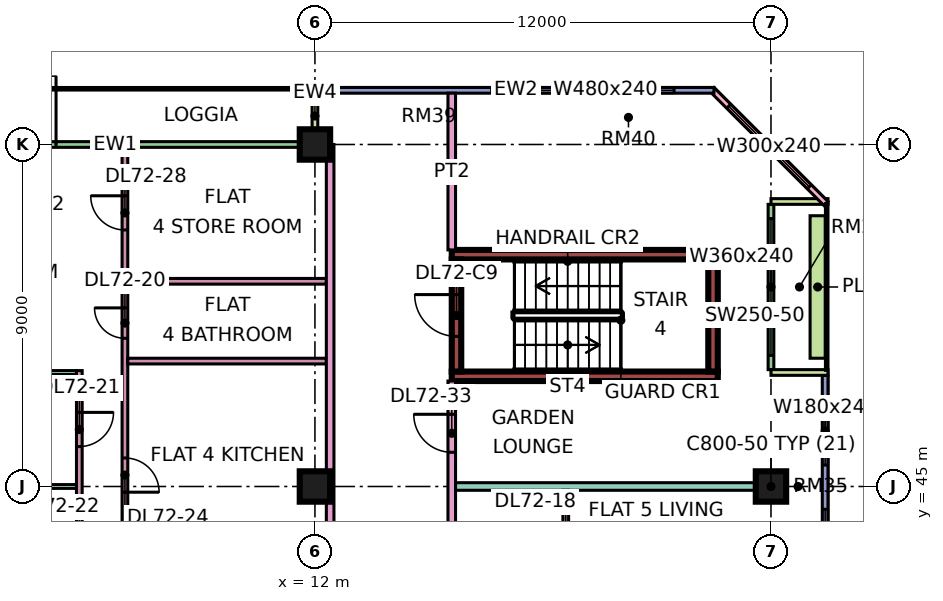
"""IFC4 building model, lengths in metres.
Left out: names, types, materials, properties, quantities, classifications, styles, units other than length and angle.
Written with IfcOpenShell. Run it as: python <this file> out.ifc"""

import sys

from ifc_helpers import new_model, si_unit, direction, frame, frame_2d, origin, origin_2d, place, context, subcontext, project, spatial, rectangle, extrude, element, fill, save


model = new_model("IFC4")
c1 = context("Model", 3, precision=1e-05, world=origin(), true_north=direction((0.0, 1.0)))
c2 = subcontext(c1, "Body", "Model", "MODEL_VIEW")
j1 = project(units=[si_unit("LENGTHUNIT", "METRE"), si_unit("PLANEANGLEUNIT", "RADIAN")], contexts=[c1])
p1 = place(None, origin())
s1 = spatial("IfcSite", under=j1, at=p1, CompositionType="ELEMENT")
p2 = place(p1, origin())
s2 = spatial("IfcBuilding", under=s1, at=p2, CompositionType="ELEMENT")
p3 = place(p2, frame((0.0, 0.0, 307.15)))
s3 = spatial("IfcBuildingStorey", under=s2, at=p3, CompositionType="ELEMENT", Elevation=307.15)
for number, where, z_axis, x_axis in (
    (1, (12.0, 45.0, 0.0), (0.0, 0.0, 1.0), (1.0, 0.0, 0.0)),
    (2, (12.0, 54.0, 0.0), (0.0, 0.0, 1.0), (1.0, 0.0, 0.0)),
    (3, (24.0, 45.0, 0.0), (0.0, 0.0, 1.0), (1.0, 0.0, 0.0)),
):
    element("IfcColumn", number, at=place(p3, frame(where, z_axis=z_axis, x_axis=x_axis)), inside=s3, PredefinedType="COLUMN", context=c2, shape_type="SweptSolid", body=[
        extrude(rectangle(XDim=0.8, YDim=0.8, at=origin_2d()), origin(), (0.0, 0.0, 1.0), 3.75),
    ])
for number, where, z_axis, x_axis in (
    (4, (15.6, 47.9, 0.0), (0.0, 0.0, 1.0), (1.0, 0.0, 0.0)),
    (5, (15.6, 51.1, 0.0), (0.0, 0.0, 1.0), (1.0, 0.0, 0.0)),
):
    element("IfcWall", number, at=place(p3, frame(where, z_axis=z_axis, x_axis=x_axis)), inside=s3, PredefinedType="SHEAR", context=c2, shape_type="SweptSolid", body=[
        extrude(rectangle(XDim=7.0, YDim=0.25, at=frame_2d((3.5, 0.0))), origin(), (0.0, 0.0, 1.0), 3.75),
    ])
p4 = place(p3, frame((15.725, 48.025, 0.0), z_axis=(0.0, 0.0, 1.0), x_axis=(0.0, 1.0, 0.0)))
e6 = element("IfcWall", 6, at=p4, inside=s3, PredefinedType="SHEAR", context=c2, shape_type="SweptSolid", body=[
    extrude(rectangle(XDim=2.95, YDim=0.25, at=frame_2d((1.475, 0.0))), origin(), (0.0, 0.0, 1.0), 3.75),
])
p5 = place(p4, frame((0.925, 0.0, 0.0)))
e7 = element("IfcOpeningElement", 7, at=p5, cuts=e6, PredefinedType="OPENING", context=c2, shape_type="SweptSolid", body=[
    extrude(rectangle(XDim=1.1, YDim=2.2, at=frame_2d((0.55, 1.1))), frame((0.0, 0.135, 0.0), z_axis=(0.0, -1.0, 0.0), x_axis=(1.0, 0.0, 0.0)), (0.0, 0.0, 1.0), 0.27),
])
p6 = place(p3, frame((22.475, 48.025, 0.0), z_axis=(0.0, 0.0, 1.0), x_axis=(0.0, 1.0, 0.0)))
e8 = element("IfcWall", 8, at=p6, inside=s3, PredefinedType="SHEAR", context=c2, shape_type="SweptSolid", body=[
    extrude(rectangle(XDim=2.95, YDim=0.25, at=frame_2d((1.475, 0.0))), origin(), (0.0, 0.0, 1.0), 3.75),
])
p7 = place(p3, frame((25.425, 40.5, 0.0), z_axis=(0.0, 0.0, 1.0), x_axis=(0.0, 1.0, 0.0)))
e9 = element("IfcWall", 9, at=p7, inside=s3, PredefinedType="SOLIDWALL", context=c2, shape_type="SweptSolid", body=[
    extrude(rectangle(XDim=7.425, YDim=0.15, at=frame_2d((3.712, 0.0))), origin(), (0.0, 0.0, 1.0), 3.35),
])
p8 = place(p7, frame((0.3, 0.0, 0.45)))
e10 = element("IfcOpeningElement", 10, at=p8, cuts=e9, PredefinedType="OPENING", context=c2, shape_type="SweptSolid", body=[
    extrude(rectangle(XDim=0.9, YDim=2.4, at=frame_2d((0.45, 1.2))), frame((0.0, 0.085, 0.0), z_axis=(0.0, -1.0, 0.0), x_axis=(1.0, 0.0, 0.0)), (0.0, 0.0, 1.0), 0.17),
])
p9 = place(p7, frame((2.1, 0.0, 0.45)))
e11 = element("IfcOpeningElement", 11, at=p9, cuts=e9, PredefinedType="OPENING", context=c2, shape_type="SweptSolid", body=[
    extrude(rectangle(XDim=1.8, YDim=2.4, at=frame_2d((0.9, 1.2))), frame((0.0, 0.085, 0.0), z_axis=(0.0, -1.0, 0.0), x_axis=(1.0, 0.0, 0.0)), (0.0, 0.0, 1.0), 0.17),
])
p10 = place(p7, frame((5.062, 0.0, 0.45)))
e12 = element("IfcOpeningElement", 12, at=p10, cuts=e9, PredefinedType="OPENING", context=c2, shape_type="SweptSolid", body=[
    extrude(rectangle(XDim=1.8, YDim=2.4, at=frame_2d((0.9, 1.2))), frame((0.0, 0.085, 0.0), z_axis=(0.0, -1.0, 0.0), x_axis=(1.0, 0.0, 0.0)), (0.0, 0.0, 1.0), 0.17),
])
p11 = place(p3, frame((24.0, 48.075, 0.0), z_axis=(0.0, 0.0, 1.0), x_axis=(0.0, 1.0, 0.0)))
e13 = element("IfcWall", 13, at=p11, inside=s3, PredefinedType="SOLIDWALL", context=c2, shape_type="SweptSolid", body=[
    extrude(rectangle(XDim=4.35, YDim=0.15, at=frame_2d((2.175, 0.0))), origin(), (0.0, 0.0, 1.0), 3.35),
])
p12 = place(p11, frame((0.375, 0.0, 0.45)))
e14 = element("IfcOpeningElement", 14, at=p12, cuts=e13, PredefinedType="OPENING", context=c2, shape_type="SweptSolid", body=[
    extrude(rectangle(XDim=3.6, YDim=2.4, at=frame_2d((1.8, 1.2))), frame((0.0, 0.085, 0.0), z_axis=(0.0, -1.0, 0.0), x_axis=(1.0, 0.0, 0.0)), (0.0, 0.0, 1.0), 0.17),
])
for number, where, z_axis, x_axis in (
    (15, (25.5, 48.0, 0.0), (0.0, 0.0, 1.0), (-1.0, 0.0, 0.0)),
    (16, (25.5, 52.5, 0.0), (0.0, 0.0, 1.0), (-1.0, 0.0, 0.0)),
):
    element("IfcWall", number, at=place(p3, frame(where, z_axis=z_axis, x_axis=x_axis)), inside=s3, PredefinedType="SOLIDWALL", context=c2, shape_type="SweptSolid", body=[
        extrude(rectangle(XDim=1.5, YDim=0.15, at=frame_2d((0.75, 0.0))), origin(), (0.0, 0.0, 1.0), 3.35),
    ])
p13 = place(p3, frame((25.447, 52.447, 0.0), z_axis=(0.0, 0.0, 1.0), x_axis=(-0.707106781187, 0.707106781187, 0.0)))
e17 = element("IfcWall", 17, at=p13, inside=s3, PredefinedType="SOLIDWALL", context=c2, shape_type="SweptSolid", body=[
    extrude(rectangle(XDim=4.243, YDim=0.15, at=frame_2d((2.121, 0.0))), origin(), (0.0, 0.0, 1.0), 3.35),
])
p14 = place(p13, frame((0.621, 0.0, 0.45)))
e18 = element("IfcOpeningElement", 18, at=p14, cuts=e17, PredefinedType="OPENING", context=c2, shape_type="SweptSolid", body=[
    extrude(rectangle(XDim=3.0, YDim=2.4, at=frame_2d((1.5, 1.2))), frame((0.0, 0.085, 0.0), z_axis=(0.0, -1.0, 0.0), x_axis=(1.0, 0.0, 0.0)), (0.0, 0.0, 1.0), 0.17),
])
p15 = place(p3, frame((22.5, 55.425, 0.0), z_axis=(0.0, 0.0, 1.0), x_axis=(-1.0, 0.0, 0.0)))
e19 = element("IfcWall", 19, at=p15, inside=s3, PredefinedType="SOLIDWALL", context=c2, shape_type="SweptSolid", body=[
    extrude(rectangle(XDim=10.425, YDim=0.15, at=frame_2d((5.212, 0.0))), origin(), (0.0, 0.0, 1.0), 3.35),
])
p16 = place(p15, frame((1.05, 0.0, 0.45)))
e20 = element("IfcOpeningElement", 20, at=p16, cuts=e19, PredefinedType="OPENING", context=c2, shape_type="SweptSolid", body=[
    extrude(rectangle(XDim=4.8, YDim=2.4, at=frame_2d((2.4, 1.2))), frame((0.0, 0.085, 0.0), z_axis=(0.0, -1.0, 0.0), x_axis=(1.0, 0.0, 0.0)), (0.0, 0.0, 1.0), 0.17),
])
p17 = place(p3, frame((11.925, 54.0, 0.0), z_axis=(0.0, 0.0, 1.0), x_axis=(-1.0, 0.0, 0.0)))
e21 = element("IfcWall", 21, at=p17, inside=s3, PredefinedType="SOLIDWALL", context=c2, shape_type="SweptSolid", body=[
    extrude(rectangle(XDim=10.35, YDim=0.15, at=frame_2d((5.175, 0.0))), origin(), (0.0, 0.0, 1.0), 3.35),
])
p18 = place(p17, frame((6.738, 0.0, 0.0)))
e22 = element("IfcOpeningElement", 22, at=p18, cuts=e21, PredefinedType="OPENING", context=c2, shape_type="SweptSolid", body=[
    extrude(rectangle(XDim=1.8, YDim=2.4, at=frame_2d((0.9, 1.2))), frame((0.0, 0.085, 0.0), z_axis=(0.0, -1.0, 0.0), x_axis=(1.0, 0.0, 0.0)), (0.0, 0.0, 1.0), 0.17),
])
p19 = place(p3, frame((12.0, 55.5, 0.0), z_axis=(0.0, 0.0, 1.0), x_axis=(0.0, -1.0, 0.0)))
e23 = element("IfcWall", 23, at=p19, inside=s3, PredefinedType="SOLIDWALL", context=c2, shape_type="SweptSolid", body=[
    extrude(rectangle(XDim=1.5, YDim=0.15, at=frame_2d((0.75, 0.0))), origin(), (0.0, 0.0, 1.0), 3.35),
])
p20 = place(p3, frame((25.229, 48.375, 0.0), z_axis=(0.0, 0.0, 1.0), x_axis=(0.0, 1.0, 0.0)))
e24 = element("IfcWall", 24, at=p20, inside=s3, PredefinedType="SOLIDWALL", context=c2, shape_type="SweptSolid", body=[
    extrude(rectangle(XDim=3.75, YDim=0.4, at=frame_2d((1.875, 0.0))), origin(), (0.0, 0.0, 1.0), 0.7),
])
p21 = place(p3, frame((-1.351, 45.0, 0.0), z_axis=(0.0, 0.0, 1.0), x_axis=(1.0, 0.0, 0.0)))
e25 = element("IfcWall", 25, at=p21, inside=s3, PredefinedType="PARTITIONING", context=c2, shape_type="SweptSolid", body=[
    extrude(rectangle(XDim=7.076, YDim=0.1, at=frame_2d((3.538, 0.0))), origin(), (0.0, 0.0, 1.0), 3.35),
])
p22 = place(p3, frame((0.0, 48.0, 0.0), z_axis=(0.0, 0.0, 1.0), x_axis=(1.0, 0.0, 0.0)))
e26 = element("IfcWall", 26, at=p22, inside=s3, PredefinedType="PARTITIONING", context=c2, shape_type="SweptSolid", body=[
    extrude(rectangle(XDim=5.725, YDim=0.1, at=frame_2d((2.863, 0.0))), origin(), (0.0, 0.0, 1.0), 3.35),
])
p23 = place(p3, frame((5.8, 36.1, 0.0), z_axis=(0.0, 0.0, 1.0), x_axis=(0.0, 1.0, 0.0)))
e27 = element("IfcWall", 27, at=p23, inside=s3, PredefinedType="PARTITIONING", context=c2, shape_type="SweptSolid", body=[
    extrude(rectangle(XDim=11.95, YDim=0.15, at=frame_2d((5.975, 0.0))), origin(), (0.0, 0.0, 1.0), 3.35),
])
p24 = place(p23, frame((9.95, 0.0, 0.0)))
e28 = element("IfcOpeningElement", 28, at=p24, cuts=e27, PredefinedType="OPENING", context=c2, shape_type="SweptSolid", body=[
    extrude(rectangle(XDim=0.9, YDim=2.1, at=frame_2d((0.45, 1.05))), frame((0.0, 0.085, 0.0), z_axis=(0.0, -1.0, 0.0), x_axis=(1.0, 0.0, 0.0)), (0.0, 0.0, 1.0), 0.17),
])
p25 = place(p23, frame((6.95, 0.0, 0.0)))
e29 = element("IfcOpeningElement", 29, at=p25, cuts=e27, PredefinedType="OPENING", context=c2, shape_type="SweptSolid", body=[
    extrude(rectangle(XDim=0.9, YDim=2.1, at=frame_2d((0.45, 1.05))), frame((0.0, 0.085, 0.0), z_axis=(0.0, -1.0, 0.0), x_axis=(1.0, 0.0, 0.0)), (0.0, 0.0, 1.0), 0.17),
])
p26 = place(p23, frame((0.55, 0.0, 0.0)))
e30 = element("IfcOpeningElement", 30, at=p26, cuts=e27, PredefinedType="OPENING", context=c2, shape_type="SweptSolid", body=[
    extrude(rectangle(XDim=1.6, YDim=2.1, at=frame_2d((0.8, 1.05))), frame((0.0, 0.085, 0.0), z_axis=(0.0, -1.0, 0.0), x_axis=(1.0, 0.0, 0.0)), (0.0, 0.0, 1.0), 0.17),
])
p27 = place(p3, frame((7.0, 42.25, 0.0), z_axis=(0.0, 0.0, 1.0), x_axis=(0.0, 1.0, 0.0)))
e31 = element("IfcWall", 31, at=p27, inside=s3, PredefinedType="PARTITIONING", context=c2, shape_type="SweptSolid", body=[
    extrude(rectangle(XDim=11.676, YDim=0.15, at=frame_2d((5.838, 0.0))), origin(), (0.0, 0.0, 1.0), 3.35),
])
p28 = place(p27, frame((6.65, 0.0, 0.0)))
e32 = element("IfcOpeningElement", 32, at=p28, cuts=e31, PredefinedType="OPENING", context=c2, shape_type="SweptSolid", body=[
    extrude(rectangle(XDim=0.8, YDim=2.1, at=frame_2d((0.4, 1.05))), frame((0.0, 0.085, 0.0), z_axis=(0.0, -1.0, 0.0), x_axis=(1.0, 0.0, 0.0)), (0.0, 0.0, 1.0), 0.17),
])
p29 = place(p27, frame((2.6, 0.0, 0.0)))
e33 = element("IfcOpeningElement", 33, at=p29, cuts=e31, PredefinedType="OPENING", context=c2, shape_type="SweptSolid", body=[
    extrude(rectangle(XDim=0.9, YDim=2.1, at=frame_2d((0.45, 1.05))), frame((0.0, 0.085, 0.0), z_axis=(0.0, -1.0, 0.0), x_axis=(1.0, 0.0, 0.0)), (0.0, 0.0, 1.0), 0.17),
])
p30 = place(p27, frame((9.5, 0.0, 0.0)))
e34 = element("IfcOpeningElement", 34, at=p30, cuts=e31, PredefinedType="OPENING", context=c2, shape_type="SweptSolid", body=[
    extrude(rectangle(XDim=0.9, YDim=2.1, at=frame_2d((0.45, 1.05))), frame((0.0, 0.085, 0.0), z_axis=(0.0, -1.0, 0.0), x_axis=(1.0, 0.0, 0.0)), (0.0, 0.0, 1.0), 0.17),
])
for number, where, z_axis, x_axis in (
    (35, (7.075, 48.3, 0.0), (0.0, 0.0, 1.0), (1.0, 0.0, 0.0)),
    (36, (7.075, 50.4, 0.0), (0.0, 0.0, 1.0), (1.0, 0.0, 0.0)),
):
    element("IfcWall", number, at=place(p3, frame(where, z_axis=z_axis, x_axis=x_axis)), inside=s3, PredefinedType="PARTITIONING", context=c2, shape_type="SweptSolid", body=[
        extrude(rectangle(XDim=5.225, YDim=0.15, at=frame_2d((2.613, 0.0))), origin(), (0.0, 0.0, 1.0), 3.35),
    ])
p31 = place(p3, frame((12.4, 20.0, 0.0), z_axis=(0.0, 0.0, 1.0), x_axis=(0.0, 1.0, 0.0)))
e37 = element("IfcWall", 37, at=p31, inside=s3, PredefinedType="PARTITIONING", context=c2, shape_type="SweptSolid", body=[
    extrude(rectangle(XDim=34.0, YDim=0.2, at=frame_2d((17.0, 0.0))), origin(), (0.0, 0.0, 1.0), 3.35),
])
p32 = place(p31, frame((19.8, 0.0, 0.0)))
e38 = element("IfcOpeningElement", 38, at=p32, cuts=e37, PredefinedType="OPENING", context=c2, shape_type="SweptSolid", body=[
    extrude(rectangle(XDim=1.0, YDim=2.1, at=frame_2d((0.5, 1.05))), frame((0.0, 0.11, 0.0), z_axis=(0.0, -1.0, 0.0), x_axis=(1.0, 0.0, 0.0)), (0.0, 0.0, 1.0), 0.22),
])
p33 = place(p31, frame((0.6, 0.0, 0.0)))
e39 = element("IfcOpeningElement", 39, at=p33, cuts=e37, PredefinedType="OPENING", context=c2, shape_type="SweptSolid", body=[
    extrude(rectangle(XDim=1.2, YDim=2.1, at=frame_2d((0.6, 1.05))), frame((0.0, 0.11, 0.0), z_axis=(0.0, -1.0, 0.0), x_axis=(1.0, 0.0, 0.0)), (0.0, 0.0, 1.0), 0.22),
])
p34 = place(p31, frame((4.5, 0.0, 0.0)))
e40 = element("IfcOpeningElement", 40, at=p34, cuts=e37, PredefinedType="OPENING", context=c2, shape_type="SweptSolid", body=[
    extrude(rectangle(XDim=1.0, YDim=2.1, at=frame_2d((0.5, 1.05))), frame((0.0, 0.11, 0.0), z_axis=(0.0, -1.0, 0.0), x_axis=(1.0, 0.0, 0.0)), (0.0, 0.0, 1.0), 0.22),
])
p35 = place(p3, frame((15.6, 20.0, 0.0), z_axis=(0.0, 0.0, 1.0), x_axis=(0.0, 1.0, 0.0)))
e41 = element("IfcWall", 41, at=p35, inside=s3, PredefinedType="PARTITIONING", context=c2, shape_type="SweptSolid", body=[
    extrude(rectangle(XDim=27.775, YDim=0.2, at=frame_2d((13.887, 0.0))), origin(), (0.0, 0.0, 1.0), 3.35),
])
p36 = place(p35, frame((7.0, 0.0, 0.0)))
e42 = element("IfcOpeningElement", 42, at=p36, cuts=e41, PredefinedType="OPENING", context=c2, shape_type="SweptSolid", body=[
    extrude(rectangle(XDim=1.0, YDim=2.1, at=frame_2d((0.5, 1.05))), frame((0.0, 0.11, 0.0), z_axis=(0.0, -1.0, 0.0), x_axis=(1.0, 0.0, 0.0)), (0.0, 0.0, 1.0), 0.22),
])
p37 = place(p35, frame((12.95, 0.0, 0.0)))
e43 = element("IfcOpeningElement", 43, at=p37, cuts=e41, PredefinedType="OPENING", context=c2, shape_type="SweptSolid", body=[
    extrude(rectangle(XDim=1.0, YDim=2.1, at=frame_2d((0.5, 1.05))), frame((0.0, 0.11, 0.0), z_axis=(0.0, -1.0, 0.0), x_axis=(1.0, 0.0, 0.0)), (0.0, 0.0, 1.0), 0.22),
])
p38 = place(p35, frame((16.75, 0.0, 0.0)))
e44 = element("IfcOpeningElement", 44, at=p38, cuts=e41, PredefinedType="OPENING", context=c2, shape_type="SweptSolid", body=[
    extrude(rectangle(XDim=1.0, YDim=2.1, at=frame_2d((0.5, 1.05))), frame((0.0, 0.11, 0.0), z_axis=(0.0, -1.0, 0.0), x_axis=(1.0, 0.0, 0.0)), (0.0, 0.0, 1.0), 0.22),
])
p39 = place(p35, frame((1.15, 0.0, 0.0)))
e45 = element("IfcOpeningElement", 45, at=p39, cuts=e41, PredefinedType="OPENING", context=c2, shape_type="SweptSolid", body=[
    extrude(rectangle(XDim=1.8, YDim=2.1, at=frame_2d((0.9, 1.05))), frame((0.0, 0.11, 0.0), z_axis=(0.0, -1.0, 0.0), x_axis=(1.0, 0.0, 0.0)), (0.0, 0.0, 1.0), 0.22),
])
p40 = place(p35, frame((25.9, 0.0, 0.0)))
e46 = element("IfcOpeningElement", 46, at=p40, cuts=e41, PredefinedType="OPENING", context=c2, shape_type="SweptSolid", body=[
    extrude(rectangle(XDim=1.0, YDim=2.1, at=frame_2d((0.5, 1.05))), frame((0.0, 0.11, 0.0), z_axis=(0.0, -1.0, 0.0), x_axis=(1.0, 0.0, 0.0)), (0.0, 0.0, 1.0), 0.22),
])
p41 = place(p3, frame((15.6, 51.225, 0.0), z_axis=(0.0, 0.0, 1.0), x_axis=(0.0, 1.0, 0.0)))
e47 = element("IfcWall", 47, at=p41, inside=s3, PredefinedType="PARTITIONING", context=c2, shape_type="SweptSolid", body=[
    extrude(rectangle(XDim=4.125, YDim=0.2, at=frame_2d((2.062, 0.0))), origin(), (0.0, 0.0, 1.0), 3.35),
])
p42 = place(p3, frame((15.7, 45.0, 0.0), z_axis=(0.0, 0.0, 1.0), x_axis=(1.0, 0.0, 0.0)))
e48 = element("IfcWall", 48, at=p42, inside=s3, PredefinedType="PARTITIONING", context=c2, shape_type="SweptSolid", body=[
    extrude(rectangle(XDim=8.3, YDim=0.2, at=frame_2d((4.15, 0.0))), origin(), (0.0, 0.0, 1.0), 3.35),
])
p43 = place(p3, frame((18.6, 38.325, 0.0), z_axis=(0.0, 0.0, 1.0), x_axis=(0.0, 1.0, 0.0)))
e49 = element("IfcWall", 49, at=p43, inside=s3, PredefinedType="PARTITIONING", context=c2, shape_type="SweptSolid", body=[
    extrude(rectangle(XDim=6.575, YDim=0.15, at=frame_2d((3.288, 0.0))), origin(), (0.0, 0.0, 1.0), 3.35),
])
p44 = place(p43, frame((1.225, 0.0, 0.0)))
e50 = element("IfcOpeningElement", 50, at=p44, cuts=e49, PredefinedType="OPENING", context=c2, shape_type="SweptSolid", body=[
    extrude(rectangle(XDim=0.8, YDim=2.1, at=frame_2d((0.4, 1.05))), frame((0.0, 0.085, 0.0), z_axis=(0.0, -1.0, 0.0), x_axis=(1.0, 0.0, 0.0)), (0.0, 0.0, 1.0), 0.17),
])
p45 = place(p43, frame((4.425, 0.0, 0.0)))
e51 = element("IfcOpeningElement", 51, at=p45, cuts=e49, PredefinedType="OPENING", context=c2, shape_type="SweptSolid", body=[
    extrude(rectangle(XDim=0.9, YDim=2.1, at=frame_2d((0.45, 1.05))), frame((0.0, 0.085, 0.0), z_axis=(0.0, -1.0, 0.0), x_axis=(1.0, 0.0, 0.0)), (0.0, 0.0, 1.0), 0.17),
])
p46 = place(p9, origin())
e52 = element("IfcWindow", 52, at=p46, inside=s3, PartitioningType="SINGLE_PANEL", PredefinedType="WINDOW", context=c2, shape_type="SweptSolid", body=[
    extrude(rectangle(XDim=1.8, YDim=2.4, at=frame_2d((0.9, 1.2))), frame((0.0, 0.03, 0.0), z_axis=(0.0, -1.0, 0.0), x_axis=(1.0, 0.0, 0.0)), (0.0, 0.0, 1.0), 0.06),
])
fill(e11, e52)
p47 = place(p10, origin())
e53 = element("IfcWindow", 53, at=p47, inside=s3, PartitioningType="SINGLE_PANEL", PredefinedType="WINDOW", context=c2, shape_type="SweptSolid", body=[
    extrude(rectangle(XDim=1.8, YDim=2.4, at=frame_2d((0.9, 1.2))), frame((0.0, 0.03, 0.0), z_axis=(0.0, -1.0, 0.0), x_axis=(1.0, 0.0, 0.0)), (0.0, 0.0, 1.0), 0.06),
])
fill(e12, e53)
p48 = place(p12, origin())
e54 = element("IfcWindow", 54, at=p48, inside=s3, PartitioningType="SINGLE_PANEL", PredefinedType="WINDOW", context=c2, shape_type="SweptSolid", body=[
    extrude(rectangle(XDim=3.6, YDim=2.4, at=frame_2d((1.8, 1.2))), frame((0.0, 0.03, 0.0), z_axis=(0.0, -1.0, 0.0), x_axis=(1.0, 0.0, 0.0)), (0.0, 0.0, 1.0), 0.06),
])
fill(e14, e54)
p49 = place(p14, origin())
e55 = element("IfcWindow", 55, at=p49, inside=s3, PartitioningType="SINGLE_PANEL", PredefinedType="WINDOW", context=c2, shape_type="SweptSolid", body=[
    extrude(rectangle(XDim=3.0, YDim=2.4, at=frame_2d((1.5, 1.2))), frame((0.0, 0.03, 0.0), z_axis=(0.0, -1.0, 0.0), x_axis=(1.0, 0.0, 0.0)), (0.0, 0.0, 1.0), 0.06),
])
fill(e18, e55)
p50 = place(p16, origin())
e56 = element("IfcWindow", 56, at=p50, inside=s3, PartitioningType="SINGLE_PANEL", PredefinedType="WINDOW", context=c2, shape_type="SweptSolid", body=[
    extrude(rectangle(XDim=4.8, YDim=2.4, at=frame_2d((2.4, 1.2))), frame((0.0, 0.03, 0.0), z_axis=(0.0, -1.0, 0.0), x_axis=(1.0, 0.0, 0.0)), (0.0, 0.0, 1.0), 0.06),
])
fill(e20, e56)
p51 = place(p18, frame((1.8, 0.0, 0.0), z_axis=(0.0, 0.0, 1.0), x_axis=(-1.0, 0.0, 0.0)))
e57 = element("IfcDoor", 57, at=p51, inside=s3, OperationType="DOUBLE_DOOR_SINGLE_SWING", PredefinedType="DOOR", context=c2, shape_type="SweptSolid", body=[
    extrude(rectangle(XDim=1.8, YDim=2.4, at=frame_2d((0.9, 1.2))), frame((0.0, 0.025, 0.0), z_axis=(0.0, -1.0, 0.0), x_axis=(1.0, 0.0, 0.0)), (0.0, 0.0, 1.0), 0.05),
])
fill(e22, e57)
p52 = place(p5, frame((1.1, 0.0, 0.0), z_axis=(0.0, 0.0, 1.0), x_axis=(-1.0, 0.0, 0.0)))
e58 = element("IfcDoor", 58, at=p52, inside=s3, OperationType="SINGLE_SWING_RIGHT", PredefinedType="DOOR", context=c2, shape_type="SweptSolid", body=[
    extrude(rectangle(XDim=1.1, YDim=2.2, at=frame_2d((0.55, 1.1))), frame((0.0, 0.025, 0.0), z_axis=(0.0, -1.0, 0.0), x_axis=(1.0, 0.0, 0.0)), (0.0, 0.0, 1.0), 0.05),
])
fill(e7, e58)
p53 = place(p28, frame((0.8, 0.0, 0.0), z_axis=(0.0, 0.0, 1.0), x_axis=(-1.0, 0.0, 0.0)))
e59 = element("IfcDoor", 59, at=p53, inside=s3, OperationType="SINGLE_SWING_RIGHT", PredefinedType="DOOR", context=c2, shape_type="SweptSolid", body=[
    extrude(rectangle(XDim=0.8, YDim=2.1, at=frame_2d((0.4, 1.05))), frame((0.0, 0.025, 0.0), z_axis=(0.0, -1.0, 0.0), x_axis=(1.0, 0.0, 0.0)), (0.0, 0.0, 1.0), 0.05),
])
fill(e32, e59)
p54 = place(p24, origin())
e60 = element("IfcDoor", 60, at=p54, inside=s3, OperationType="SINGLE_SWING_RIGHT", PredefinedType="DOOR", context=c2, shape_type="SweptSolid", body=[
    extrude(rectangle(XDim=0.9, YDim=2.1, at=frame_2d((0.45, 1.05))), frame((0.0, 0.025, 0.0), z_axis=(0.0, -1.0, 0.0), x_axis=(1.0, 0.0, 0.0)), (0.0, 0.0, 1.0), 0.05),
])
fill(e28, e60)
p55 = place(p29, frame((0.9, 0.0, 0.0), z_axis=(0.0, 0.0, 1.0), x_axis=(-1.0, 0.0, 0.0)))
e61 = element("IfcDoor", 61, at=p55, inside=s3, OperationType="SINGLE_SWING_LEFT", PredefinedType="DOOR", context=c2, shape_type="SweptSolid", body=[
    extrude(rectangle(XDim=0.9, YDim=2.1, at=frame_2d((0.45, 1.05))), frame((0.0, 0.025, 0.0), z_axis=(0.0, -1.0, 0.0), x_axis=(1.0, 0.0, 0.0)), (0.0, 0.0, 1.0), 0.05),
])
fill(e33, e61)
p56 = place(p30, frame((0.9, 0.0, 0.0), z_axis=(0.0, 0.0, 1.0), x_axis=(-1.0, 0.0, 0.0)))
e62 = element("IfcDoor", 62, at=p56, inside=s3, OperationType="SINGLE_SWING_RIGHT", PredefinedType="DOOR", context=c2, shape_type="SweptSolid", body=[
    extrude(rectangle(XDim=0.9, YDim=2.1, at=frame_2d((0.45, 1.05))), frame((0.0, 0.025, 0.0), z_axis=(0.0, -1.0, 0.0), x_axis=(1.0, 0.0, 0.0)), (0.0, 0.0, 1.0), 0.05),
])
fill(e34, e62)
p57 = place(p40, frame((1.0, 0.0, 0.0), z_axis=(0.0, 0.0, 1.0), x_axis=(-1.0, 0.0, 0.0)))
e63 = element("IfcDoor", 63, at=p57, inside=s3, OperationType="SINGLE_SWING_RIGHT", PredefinedType="DOOR", context=c2, shape_type="SweptSolid", body=[
    extrude(rectangle(XDim=1.0, YDim=2.1, at=frame_2d((0.5, 1.05))), frame((0.0, 0.025, 0.0), z_axis=(0.0, -1.0, 0.0), x_axis=(1.0, 0.0, 0.0)), (0.0, 0.0, 1.0), 0.05),
])
fill(e46, e63)
save(model, sys.argv[1])
